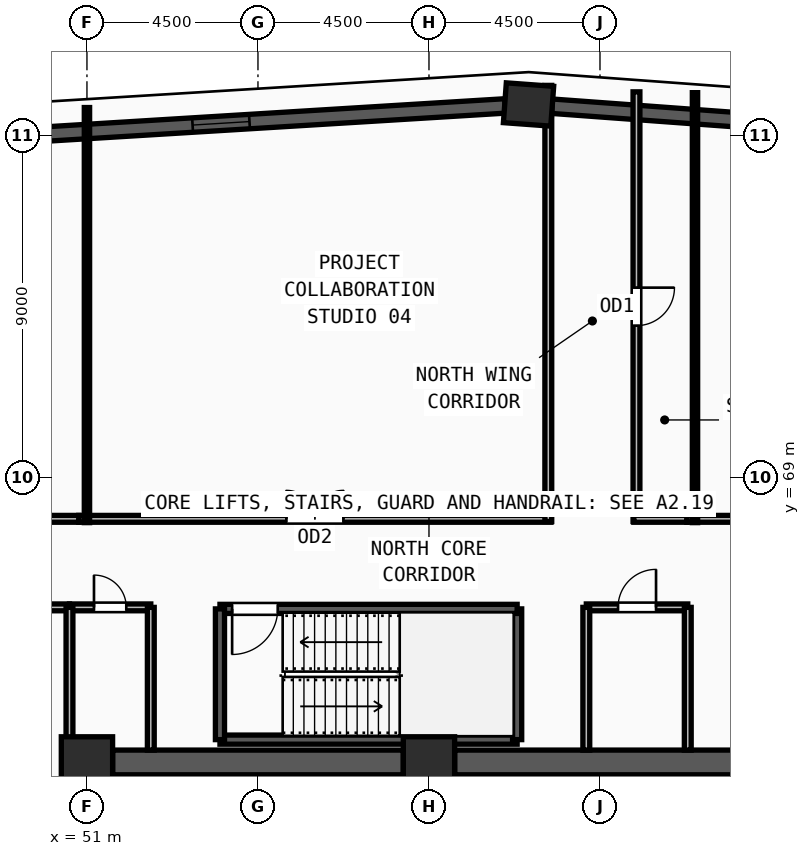
"""IFC4 building model, lengths in metres.
Left out: names, types, materials, properties, quantities, classifications, styles, units other than length and angle.
Written with IfcOpenShell. Run it as: python <this file> out.ifc"""

import sys

from ifc_helpers import new_model, si_unit, direction, frame, frame_2d, origin, origin_2d, place, context, subcontext, project, spatial, rectangle, extrude, source, transform, mapped, element, fill, save


model = new_model("IFC4")
c1 = context("Model", 3, precision=1e-05, world=origin(), true_north=direction((0.0, 1.0)))
c2 = subcontext(c1, "Body", "Model", "MODEL_VIEW")
j1 = project(units=[si_unit("LENGTHUNIT", "METRE"), si_unit("PLANEANGLEUNIT", "RADIAN")], contexts=[c1])
p1 = place(None, origin())
s1 = spatial("IfcSite", under=j1, at=p1, CompositionType="ELEMENT")
p2 = place(p1, origin())
s2 = spatial("IfcBuilding", under=s1, at=p2, CompositionType="ELEMENT")
p3 = place(p2, frame((0.0, 0.0, 194.25)))
s3 = spatial("IfcBuildingStorey", under=s2, at=p3, CompositionType="ELEMENT", Elevation=194.25)
m1 = source(origin(), c2, "Body", "SweptSolid", [
    extrude(rectangle(XDim=1.35, YDim=1.35, at=origin_2d()), origin(), (0.0, 0.0, 1.0), 3.75),
])
for number, where, z_axis, x_axis in (
    (1, (60.0, 61.5, 0.0), (0.0, 0.0, 1.0), (1.0, 0.0, 0.0)),
    (2, (51.0, 61.5, 0.0), (0.0, 0.0, 1.0), (1.0, 0.0, 0.0)),
):
    element("IfcColumn", number, at=place(p3, frame(where, z_axis=z_axis, x_axis=x_axis)), inside=s3, PredefinedType="COLUMN", context=c2, shape_type="MappedRepresentation", body=[
        mapped(m1, transform((0.0, 0.0, 0.0), x_axis=(1.0, 0.0, 0.0), y_axis=(0.0, 1.0, 0.0), z_axis=(0.0, 0.0, 1.0), scale=1.0)),
    ])
m2 = source(origin(), c2, "Body", "SweptSolid", [
    extrude(rectangle(XDim=1.25, YDim=1.05, at=origin_2d()), origin(), (0.0, 0.0, 1.0), 3.75),
])
p4 = place(p3, frame((62.62, 78.812, 0.0), z_axis=(0.0, 0.0, 1.0), x_axis=(-0.997327244511, 0.0730641318, 0.0)))
e3 = element("IfcColumn", 3, at=p4, inside=s3, PredefinedType="COLUMN", context=c2, shape_type="MappedRepresentation", body=[
    mapped(m2, transform((0.0, 0.0, 0.0), x_axis=(1.0, 0.0, 0.0), y_axis=(0.0, 1.0, 0.0), z_axis=(0.0, 0.0, 1.0), scale=1.0)),
])
p5 = place(p3, frame((87.906, 76.958, 0.0), z_axis=(0.0, 0.0, 1.0), x_axis=(-0.997322728454, 0.073125749971, 0.0)))
e4 = element("IfcWall", 4, at=p5, inside=s3, PredefinedType="SOLIDWALL", context=c2, shape_type="SweptSolid", body=[
    extrude(rectangle(XDim=24.739, YDim=0.38, at=frame_2d((12.37, 0.0))), origin(), (0.0, 0.0, 1.0), 3.57),
])
m3 = source(origin(), c2, "Body", "SweptSolid", [
    extrude(rectangle(XDim=1.5, YDim=1.9, at=frame_2d((0.75, 0.95))), frame((0.0, 0.2, 0.0), z_axis=(0.0, -1.0, 0.0), x_axis=(1.0, 0.0, 0.0)), (0.0, 0.0, 1.0), 0.4),
])
p6 = place(p5, frame((5.435, 0.0, 0.55)))
e5 = element("IfcOpeningElement", 5, at=p6, cuts=e4, PredefinedType="OPENING", context=c2, shape_type="MappedRepresentation", body=[
    mapped(m3, transform((0.0, 0.0, 0.0), x_axis=(1.0, 0.0, 0.0), y_axis=(0.0, 1.0, 0.0), z_axis=(0.0, 0.0, 1.0), scale=1.0)),
])
p7 = place(p5, frame((11.62, 0.0, 0.55)))
e6 = element("IfcOpeningElement", 6, at=p7, cuts=e4, PredefinedType="OPENING", context=c2, shape_type="MappedRepresentation", body=[
    mapped(m3, transform((0.0, 0.0, 0.0), x_axis=(1.0, 0.0, 0.0), y_axis=(0.0, 1.0, 0.0), z_axis=(0.0, 0.0, 1.0), scale=1.0)),
])
p8 = place(p5, frame((17.804, 0.0, 0.55)))
e7 = element("IfcOpeningElement", 7, at=p8, cuts=e4, PredefinedType="OPENING", context=c2, shape_type="MappedRepresentation", body=[
    mapped(m3, transform((0.0, 0.0, 0.0), x_axis=(1.0, 0.0, 0.0), y_axis=(0.0, 1.0, 0.0), z_axis=(0.0, 0.0, 1.0), scale=1.0)),
])
p9 = place(p3, frame((62.006, 78.774, 0.0), z_axis=(0.0, 0.0, 1.0), x_axis=(-0.998134246816, -0.061057557539, 0.0)))
e8 = element("IfcWall", 8, at=p9, inside=s3, PredefinedType="SOLIDWALL", context=c2, shape_type="SweptSolid", body=[
    extrude(rectangle(XDim=29.969, YDim=0.38, at=frame_2d((14.984, 0.0))), origin(), (0.0, 0.0, 1.0), 3.57),
])
p10 = place(p9, frame((6.742, 0.0, 0.55)))
e9 = element("IfcOpeningElement", 9, at=p10, cuts=e8, PredefinedType="OPENING", context=c2, shape_type="MappedRepresentation", body=[
    mapped(m3, transform((0.0, 0.0, 0.0), x_axis=(1.0, 0.0, 0.0), y_axis=(0.0, 1.0, 0.0), z_axis=(0.0, 0.0, 1.0), scale=1.0)),
])
p11 = place(p9, frame((14.234, 0.0, 0.55)))
e10 = element("IfcOpeningElement", 10, at=p11, cuts=e8, PredefinedType="OPENING", context=c2, shape_type="MappedRepresentation", body=[
    mapped(m3, transform((0.0, 0.0, 0.0), x_axis=(1.0, 0.0, 0.0), y_axis=(0.0, 1.0, 0.0), z_axis=(0.0, 0.0, 1.0), scale=1.0)),
])
p12 = place(p9, frame((21.727, 0.0, 0.55)))
e11 = element("IfcOpeningElement", 11, at=p12, cuts=e8, PredefinedType="OPENING", context=c2, shape_type="MappedRepresentation", body=[
    mapped(m3, transform((0.0, 0.0, 0.0), x_axis=(1.0, 0.0, 0.0), y_axis=(0.0, 1.0, 0.0), z_axis=(0.0, 0.0, 1.0), scale=1.0)),
])
for number, where, z_axis, x_axis in (
    (12, (51.675, 61.5, 0.0), (0.0, 0.0, 1.0), (1.0, 0.0, 0.0)),
    (13, (60.675, 61.5, 0.0), (0.0, 0.0, 1.0), (1.0, 0.0, 0.0)),
):
    element("IfcWall", number, at=place(p3, frame(where, z_axis=z_axis, x_axis=x_axis)), inside=s3, PredefinedType="SHEAR", context=c2, shape_type="SweptSolid", body=[
        extrude(rectangle(XDim=7.65, YDim=0.65, at=frame_2d((3.825, 0.0))), origin(), (0.0, 0.0, 1.0), 3.57),
    ])
p13 = place(p3, frame((54.5, 62.1, 0.0), z_axis=(0.0, 0.0, 1.0), x_axis=(1.0, 0.0, 0.0)))
e14 = element("IfcWall", 14, at=p13, inside=s3, PredefinedType="SOLIDWALL", context=c2, shape_type="SweptSolid", body=[
    extrude(rectangle(XDim=7.82, YDim=0.24, at=frame_2d((3.91, 0.0))), origin(), (0.0, 0.0, 1.0), 3.57),
])
p14 = place(p3, frame((62.32, 62.1, 0.0), z_axis=(0.0, 0.0, 1.0), x_axis=(0.0, 1.0, 0.0)))
e15 = element("IfcWall", 15, at=p14, inside=s3, PredefinedType="SOLIDWALL", context=c2, shape_type="SweptSolid", body=[
    extrude(rectangle(XDim=3.44, YDim=0.24, at=frame_2d((1.72, 0.0))), origin(), (0.0, 0.0, 1.0), 3.57),
])
p15 = place(p3, frame((62.32, 65.54, 0.0), z_axis=(0.0, 0.0, 1.0), x_axis=(-1.0, 0.0, 0.0)))
e16 = element("IfcWall", 16, at=p15, inside=s3, PredefinedType="SOLIDWALL", context=c2, shape_type="SweptSolid", body=[
    extrude(rectangle(XDim=7.82, YDim=0.24, at=frame_2d((3.91, 0.0))), origin(), (0.0, 0.0, 1.0), 3.57),
])
m4 = source(origin(), c2, "Body", "SweptSolid", [
    extrude(rectangle(XDim=1.2, YDim=2.2, at=frame_2d((0.6, 1.1))), frame((0.0, 0.13, 0.0), z_axis=(0.0, -1.0, 0.0), x_axis=(1.0, 0.0, 0.0)), (0.0, 0.0, 1.0), 0.26),
])
p16 = place(p15, frame((6.3, 0.0, 0.0)))
e17 = element("IfcOpeningElement", 17, at=p16, cuts=e16, PredefinedType="OPENING", context=c2, shape_type="MappedRepresentation", body=[
    mapped(m4, transform((0.0, 0.0, 0.0), x_axis=(1.0, 0.0, 0.0), y_axis=(0.0, 1.0, 0.0), z_axis=(0.0, 0.0, 1.0), scale=1.0)),
])
p17 = place(p3, frame((54.5, 65.54, 0.0), z_axis=(0.0, 0.0, 1.0), x_axis=(0.0, -1.0, 0.0)))
e18 = element("IfcWall", 18, at=p17, inside=s3, PredefinedType="SOLIDWALL", context=c2, shape_type="SweptSolid", body=[
    extrude(rectangle(XDim=3.44, YDim=0.24, at=frame_2d((1.72, 0.0))), origin(), (0.0, 0.0, 1.0), 3.57),
])
p18 = place(p3, frame((50.54, 65.58, 0.0), z_axis=(0.0, 0.0, 1.0), x_axis=(1.0, 0.0, 0.0)))
e19 = element("IfcWall", 19, at=p18, inside=s3, PredefinedType="PARTITIONING", context=c2, shape_type="SweptSolid", body=[
    extrude(rectangle(XDim=2.14, YDim=0.18, at=frame_2d((1.07, 0.0))), origin(), (0.0, 0.0, 1.0), 3.57),
])
m5 = source(origin(), c2, "Body", "SweptSolid", [
    extrude(rectangle(XDim=0.85, YDim=2.1, at=frame_2d((0.425, 1.05))), frame((0.0, 0.1, 0.0), z_axis=(0.0, -1.0, 0.0), x_axis=(1.0, 0.0, 0.0)), (0.0, 0.0, 1.0), 0.2),
])
p19 = place(p18, frame((0.645, 0.0, 0.0)))
e20 = element("IfcOpeningElement", 20, at=p19, cuts=e19, PredefinedType="OPENING", context=c2, shape_type="MappedRepresentation", body=[
    mapped(m5, transform((0.0, 0.0, 0.0), x_axis=(1.0, 0.0, 0.0), y_axis=(0.0, 1.0, 0.0), z_axis=(0.0, 0.0, 1.0), scale=1.0)),
])
p20 = place(p3, frame((64.14, 65.58, 0.0), z_axis=(0.0, 0.0, 1.0), x_axis=(1.0, 0.0, 0.0)))
e21 = element("IfcWall", 21, at=p20, inside=s3, PredefinedType="PARTITIONING", context=c2, shape_type="SweptSolid", body=[
    extrude(rectangle(XDim=2.67, YDim=0.18, at=frame_2d((1.335, 0.0))), origin(), (0.0, 0.0, 1.0), 3.57),
])
m6 = source(origin(), c2, "Body", "SweptSolid", [
    extrude(rectangle(XDim=1.0, YDim=2.2, at=frame_2d((0.5, 1.1))), frame((0.0, 0.1, 0.0), z_axis=(0.0, -1.0, 0.0), x_axis=(1.0, 0.0, 0.0)), (0.0, 0.0, 1.0), 0.2),
])
p21 = place(p20, frame((0.835, 0.0, 0.0)))
e22 = element("IfcOpeningElement", 22, at=p21, cuts=e21, PredefinedType="OPENING", context=c2, shape_type="MappedRepresentation", body=[
    mapped(m6, transform((0.0, 0.0, 0.0), x_axis=(1.0, 0.0, 0.0), y_axis=(0.0, 1.0, 0.0), z_axis=(0.0, 0.0, 1.0), scale=1.0)),
])
p22 = place(p3, frame((46.7, 65.58, 0.0), z_axis=(0.0, 0.0, 1.0), x_axis=(1.0, 0.0, 0.0)))
e23 = element("IfcWall", 23, at=p22, inside=s3, PredefinedType="PARTITIONING", context=c2, shape_type="SweptSolid", body=[
    extrude(rectangle(XDim=3.84, YDim=0.18, at=frame_2d((1.92, 0.0))), origin(), (0.0, 0.0, 1.0), 3.57),
])
m7 = source(origin(), c2, "Body", "SweptSolid", [
    extrude(rectangle(XDim=1.3, YDim=2.2, at=frame_2d((0.65, 1.1))), frame((0.0, 0.1, 0.0), z_axis=(0.0, -1.0, 0.0), x_axis=(1.0, 0.0, 0.0)), (0.0, 0.0, 1.0), 0.2),
])
p23 = place(p22, frame((1.27, 0.0, 0.0)))
e24 = element("IfcOpeningElement", 24, at=p23, cuts=e23, PredefinedType="OPENING", context=c2, shape_type="MappedRepresentation", body=[
    mapped(m7, transform((0.0, 0.0, 0.0), x_axis=(1.0, 0.0, 0.0), y_axis=(0.0, 1.0, 0.0), z_axis=(0.0, 0.0, 1.0), scale=1.0)),
])
p24 = place(p3, frame((66.785, 67.91, 0.0), z_axis=(0.0, 0.0, 1.0), x_axis=(1.0, 0.0, 0.0)))
e25 = element("IfcWall", 25, at=p24, inside=s3, PredefinedType="PARTITIONING", context=c2, shape_type="SweptSolid", body=[
    extrude(rectangle(XDim=8.845, YDim=0.18, at=frame_2d((4.422, 0.0))), origin(), (0.0, 0.0, 1.0), 3.57),
])
m8 = source(origin(), c2, "Body", "SweptSolid", [
    extrude(rectangle(XDim=1.5, YDim=2.2, at=frame_2d((0.75, 1.1))), frame((0.0, 0.1, 0.0), z_axis=(0.0, -1.0, 0.0), x_axis=(1.0, 0.0, 0.0)), (0.0, 0.0, 1.0), 0.2),
])
p25 = place(p24, frame((3.672, 0.0, 0.0)))
e26 = element("IfcOpeningElement", 26, at=p25, cuts=e25, PredefinedType="OPENING", context=c2, shape_type="MappedRepresentation", body=[
    mapped(m8, transform((0.0, 0.0, 0.0), x_axis=(1.0, 0.0, 0.0), y_axis=(0.0, 1.0, 0.0), z_axis=(0.0, 0.0, 1.0), scale=1.0)),
])
p26 = place(p3, frame((65.46, 79.145, 0.0), z_axis=(0.0, 0.0, 1.0), x_axis=(0.0, -1.0, 0.0)))
e27 = element("IfcWall", 27, at=p26, inside=s3, PredefinedType="PARTITIONING", context=c2, shape_type="SweptSolid", body=[
    extrude(rectangle(XDim=11.305, YDim=0.18, at=frame_2d((5.652, 0.0))), origin(), (0.0, 0.0, 1.0), 3.57),
])
p27 = place(p26, frame((5.152, 0.0, 0.0)))
e28 = element("IfcOpeningElement", 28, at=p27, cuts=e27, PredefinedType="OPENING", context=c2, shape_type="MappedRepresentation", body=[
    mapped(m6, transform((0.0, 0.0, 0.0), x_axis=(1.0, 0.0, 0.0), y_axis=(0.0, 1.0, 0.0), z_axis=(0.0, 0.0, 1.0), scale=1.0)),
])
p28 = place(p3, frame((50.785, 67.91, 0.0), z_axis=(0.0, 0.0, 1.0), x_axis=(1.0, 0.0, 0.0)))
e29 = element("IfcWall", 29, at=p28, inside=s3, PredefinedType="PARTITIONING", context=c2, shape_type="SweptSolid", body=[
    extrude(rectangle(XDim=12.425, YDim=0.18, at=frame_2d((6.212, 0.0))), origin(), (0.0, 0.0, 1.0), 3.57),
])
p29 = place(p28, frame((5.463, 0.0, 0.0)))
e30 = element("IfcOpeningElement", 30, at=p29, cuts=e29, PredefinedType="OPENING", context=c2, shape_type="MappedRepresentation", body=[
    mapped(m8, transform((0.0, 0.0, 0.0), x_axis=(1.0, 0.0, 0.0), y_axis=(0.0, 1.0, 0.0), z_axis=(0.0, 0.0, 1.0), scale=1.0)),
])
p30 = place(p3, frame((44.37, 67.91, 0.0), z_axis=(0.0, 0.0, 1.0), x_axis=(1.0, 0.0, 0.0)))
e31 = element("IfcWall", 31, at=p30, inside=s3, PredefinedType="PARTITIONING", context=c2, shape_type="SweptSolid", body=[
    extrude(rectangle(XDim=6.415, YDim=0.18, at=frame_2d((3.208, 0.0))), origin(), (0.0, 0.0, 1.0), 3.57),
])
p31 = place(p30, frame((2.457, 0.0, 0.0)))
e32 = element("IfcOpeningElement", 32, at=p31, cuts=e31, PredefinedType="OPENING", context=c2, shape_type="MappedRepresentation", body=[
    mapped(m8, transform((0.0, 0.0, 0.0), x_axis=(1.0, 0.0, 0.0), y_axis=(0.0, 1.0, 0.0), z_axis=(0.0, 0.0, 1.0), scale=1.0)),
])
p32 = place(p3, frame((50.54, 61.95, 0.0), z_axis=(0.0, 0.0, 1.0), x_axis=(0.0, 1.0, 0.0)))
e33 = element("IfcWall", 33, at=p32, inside=s3, PredefinedType="PARTITIONING", context=c2, shape_type="SweptSolid", body=[
    extrude(rectangle(XDim=3.63, YDim=0.18, at=frame_2d((1.815, 0.0))), origin(), (0.0, 0.0, 1.0), 3.57),
])
for number, where, z_axis, x_axis in (
    (34, (52.68, 61.825, 0.0), (0.0, 0.0, 1.0), (0.0, 1.0, 0.0)),
    (35, (64.14, 61.825, 0.0), (0.0, 0.0, 1.0), (0.0, 1.0, 0.0)),
    (36, (66.81, 61.825, 0.0), (0.0, 0.0, 1.0), (0.0, 1.0, 0.0)),
):
    element("IfcWall", number, at=place(p3, frame(where, z_axis=z_axis, x_axis=x_axis)), inside=s3, PredefinedType="PARTITIONING", context=c2, shape_type="SweptSolid", body=[
        extrude(rectangle(XDim=3.755, YDim=0.18, at=frame_2d((1.877, 0.0))), origin(), (0.0, 0.0, 1.0), 3.57),
    ])
p33 = place(p3, frame((65.39, 67.91, 0.0), z_axis=(0.0, 0.0, 1.0), x_axis=(1.0, 0.0, 0.0)))
e37 = element("IfcWall", 37, at=p33, inside=s3, PredefinedType="PARTITIONING", context=c2, shape_type="SweptSolid", body=[
    extrude(rectangle(XDim=1.395, YDim=0.18, at=frame_2d((0.698, 0.0))), origin(), (0.0, 0.0, 1.0), 3.57),
])
p34 = place(p3, frame((63.14, 67.84, 0.0), z_axis=(0.0, 0.0, 1.0), x_axis=(0.0, 1.0, 0.0)))
e38 = element("IfcWall", 38, at=p34, inside=s3, PredefinedType="PARTITIONING", context=c2, shape_type="SweptSolid", body=[
    extrude(rectangle(XDim=11.475, YDim=0.18, at=frame_2d((5.737, 0.0))), origin(), (0.0, 0.0, 1.0), 3.57),
])
p35 = place(p3, frame((51.0, 67.81, 0.0), z_axis=(0.0, 0.0, 1.0), x_axis=(0.0, 1.0, 0.0)))
e39 = element("IfcWall", 39, at=p35, inside=s3, PredefinedType="PARTITIONING", context=c2, shape_type="SweptSolid", body=[
    extrude(rectangle(XDim=10.922, YDim=0.14, at=frame_2d((5.461, 0.0))), origin(), (0.0, 0.0, 1.0), 3.57),
])
p36 = place(p3, frame((67.0, 67.81, 0.0), z_axis=(0.0, 0.0, 1.0), x_axis=(0.0, 1.0, 0.0)))
e40 = element("IfcWall", 40, at=p36, inside=s3, PredefinedType="PARTITIONING", context=c2, shape_type="SweptSolid", body=[
    extrude(rectangle(XDim=11.313, YDim=0.14, at=frame_2d((5.656, 0.0))), origin(), (0.0, 0.0, 1.0), 3.57),
])
m9 = source(origin(), c2, "Body", "SweptSolid", [
    extrude(rectangle(XDim=1.5, YDim=1.9, at=frame_2d((0.75, 0.95))), frame((0.0, 0.03, 0.0), z_axis=(0.0, -1.0, 0.0), x_axis=(1.0, 0.0, 0.0)), (0.0, 0.0, 1.0), 0.06),
])
p37 = place(p10, origin())
e41 = element("IfcWindow", 41, at=p37, inside=s3, PartitioningType="DOUBLE_PANEL_VERTICAL", PredefinedType="WINDOW", context=c2, shape_type="MappedRepresentation", body=[
    mapped(m9, transform((0.0, 0.0, 0.0), x_axis=(1.0, 0.0, 0.0), y_axis=(0.0, 1.0, 0.0), z_axis=(0.0, 0.0, 1.0), scale=1.0)),
])
fill(e9, e41)
m10 = source(origin(), c2, "Body", "SweptSolid", [
    extrude(rectangle(XDim=1.2, YDim=2.2, at=frame_2d((0.6, 1.1))), frame((0.0, 0.025, 0.0), z_axis=(0.0, -1.0, 0.0), x_axis=(1.0, 0.0, 0.0)), (0.0, 0.0, 1.0), 0.05),
])
p38 = place(p16, origin())
e42 = element("IfcDoor", 42, at=p38, inside=s3, OperationType="SINGLE_SWING_RIGHT", PredefinedType="DOOR", context=c2, shape_type="MappedRepresentation", body=[
    mapped(m10, transform((0.0, 0.0, 0.0), x_axis=(1.0, 0.0, 0.0), y_axis=(0.0, 1.0, 0.0), z_axis=(0.0, 0.0, 1.0), scale=1.0)),
])
fill(e17, e42)
m11 = source(origin(), c2, "Body", "SweptSolid", [
    extrude(rectangle(XDim=0.85, YDim=2.1, at=frame_2d((0.425, 1.05))), frame((0.0, 0.025, 0.0), z_axis=(0.0, -1.0, 0.0), x_axis=(1.0, 0.0, 0.0)), (0.0, 0.0, 1.0), 0.05),
])
p39 = place(p19, origin())
e43 = element("IfcDoor", 43, at=p39, inside=s3, OperationType="SINGLE_SWING_LEFT", PredefinedType="DOOR", context=c2, shape_type="MappedRepresentation", body=[
    mapped(m11, transform((0.0, 0.0, 0.0), x_axis=(1.0, 0.0, 0.0), y_axis=(0.0, 1.0, 0.0), z_axis=(0.0, 0.0, 1.0), scale=1.0)),
])
fill(e20, e43)
m12 = source(origin(), c2, "Body", "SweptSolid", [
    extrude(rectangle(XDim=1.0, YDim=2.2, at=frame_2d((0.5, 1.1))), frame((0.0, 0.025, 0.0), z_axis=(0.0, -1.0, 0.0), x_axis=(1.0, 0.0, 0.0)), (0.0, 0.0, 1.0), 0.05),
])
p40 = place(p21, origin())
e44 = element("IfcDoor", 44, at=p40, inside=s3, OperationType="SINGLE_SWING_RIGHT", PredefinedType="DOOR", context=c2, shape_type="MappedRepresentation", body=[
    mapped(m12, transform((0.0, 0.0, 0.0), x_axis=(1.0, 0.0, 0.0), y_axis=(0.0, 1.0, 0.0), z_axis=(0.0, 0.0, 1.0), scale=1.0)),
])
fill(e22, e44)
p41 = place(p27, origin())
e45 = element("IfcDoor", 45, at=p41, inside=s3, OperationType="SINGLE_SWING_LEFT", PredefinedType="DOOR", context=c2, shape_type="MappedRepresentation", body=[
    mapped(m12, transform((0.0, 0.0, 0.0), x_axis=(1.0, 0.0, 0.0), y_axis=(0.0, 1.0, 0.0), z_axis=(0.0, 0.0, 1.0), scale=1.0)),
])
fill(e28, e45)
m13 = source(origin(), c2, "Body", "SweptSolid", [
    extrude(rectangle(XDim=1.5, YDim=2.2, at=frame_2d((0.75, 1.1))), frame((0.0, 0.025, 0.0), z_axis=(0.0, -1.0, 0.0), x_axis=(1.0, 0.0, 0.0)), (0.0, 0.0, 1.0), 0.05),
])
p42 = place(p29, origin())
e46 = element("IfcDoor", 46, at=p42, inside=s3, OperationType="DOUBLE_DOOR_SINGLE_SWING", PredefinedType="DOOR", context=c2, shape_type="MappedRepresentation", body=[
    mapped(m13, transform((0.0, 0.0, 0.0), x_axis=(1.0, 0.0, 0.0), y_axis=(0.0, 1.0, 0.0), z_axis=(0.0, 0.0, 1.0), scale=1.0)),
])
fill(e30, e46)
save(model, sys.argv[1])
